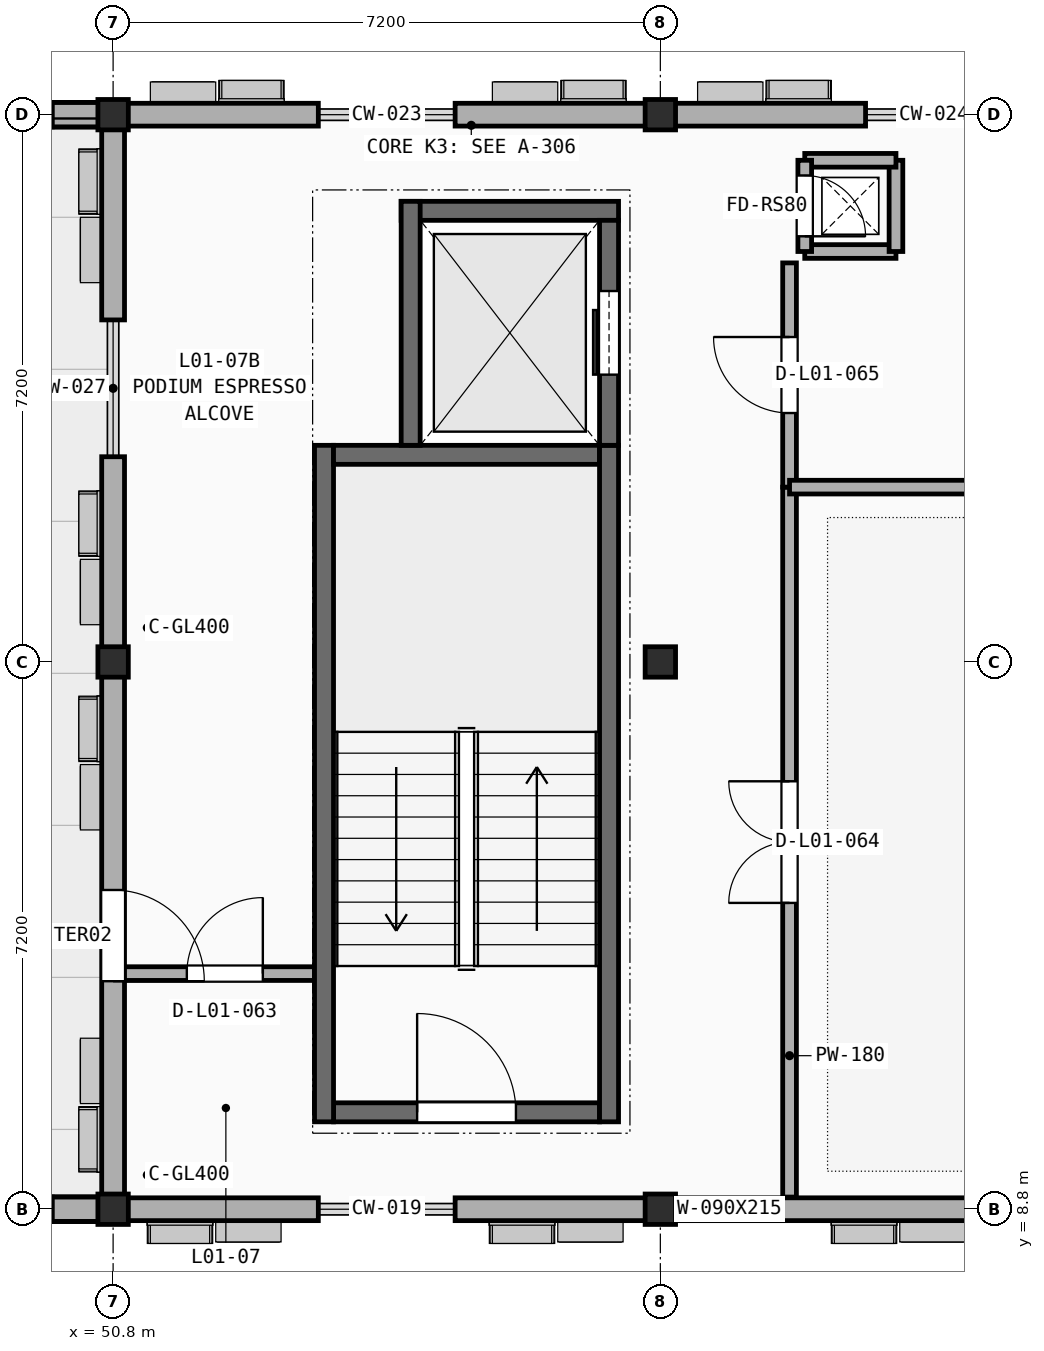
"""IFC4 building model, lengths in metres.
Left out: names, types, materials, properties, quantities, classifications, styles, units other than length and angle.
Written with IfcOpenShell. Run it as: python <this file> out.ifc"""

import sys

from ifc_helpers import new_model, si_unit, direction, frame, frame_2d, origin, origin_2d, place, context, subcontext, project, spatial, rectangle, extrude, element, fill, save


model = new_model("IFC4")
c1 = context("Model", 3, precision=1e-05, world=origin(), true_north=direction((0.0, 1.0)))
c2 = subcontext(c1, "Body", "Model", "MODEL_VIEW")
j1 = project(units=[si_unit("LENGTHUNIT", "METRE"), si_unit("PLANEANGLEUNIT", "RADIAN")], contexts=[c1])
p1 = place(None, origin())
s1 = spatial("IfcSite", under=j1, at=p1, CompositionType="ELEMENT")
p2 = place(p1, origin())
s2 = spatial("IfcBuilding", under=s1, at=p2, CompositionType="ELEMENT")
p3 = place(p2, frame((0.0, 0.0, 5.4)))
s3 = spatial("IfcBuildingStorey", under=s2, at=p3, CompositionType="ELEMENT", Elevation=5.4)
for number, where, z_axis, x_axis in (
    (1, (50.8, 8.8, 0.0), (0.0, 0.0, 1.0), (1.0, 0.0, 0.0)),
    (2, (50.8, 16.0, 0.0), (0.0, 0.0, 1.0), (1.0, 0.0, 0.0)),
    (3, (50.8, 23.2, 0.0), (0.0, 0.0, 1.0), (1.0, 0.0, 0.0)),
    (4, (58.0, 8.8, 0.0), (0.0, 0.0, 1.0), (1.0, 0.0, 0.0)),
    (5, (58.0, 16.0, 0.0), (0.0, 0.0, 1.0), (1.0, 0.0, 0.0)),
    (6, (58.0, 23.2, 0.0), (0.0, 0.0, 1.0), (1.0, 0.0, 0.0)),
):
    element("IfcColumn", number, at=place(p3, frame(where, z_axis=z_axis, x_axis=x_axis)), inside=s3, PredefinedType="COLUMN", context=c2, shape_type="SweptSolid", body=[
        extrude(rectangle(XDim=0.4, YDim=0.4, at=origin_2d()), origin(), (0.0, 0.0, 1.0), 4.2),
    ])
p4 = place(p3, frame((50.94, 11.9, 0.0), z_axis=(0.0, 0.0, 1.0), x_axis=(1.0, 0.0, 0.0)))
e7 = element("IfcWall", 7, at=p4, inside=s3, PredefinedType="PARTITIONING", context=c2, shape_type="SweptSolid", body=[
    extrude(rectangle(XDim=2.66, YDim=0.18, at=frame_2d((1.33, 0.0))), origin(), (0.0, 0.0, 1.0), 3.21),
])
p5 = place(p4, frame((0.83, 0.0, -0.01)))
e8 = element("IfcOpeningElement", 8, at=p5, cuts=e7, PredefinedType="OPENING", context=c2, shape_type="SweptSolid", body=[
    extrude(rectangle(XDim=1.0, YDim=2.16, at=frame_2d((0.5, 1.08))), frame((0.0, 0.1, 0.0), z_axis=(0.0, -1.0, 0.0), x_axis=(1.0, 0.0, 0.0)), (0.0, 0.0, 1.0), 0.2),
])
p6 = place(p3, frame((59.7, 8.96, 0.0), z_axis=(0.0, 0.0, 1.0), x_axis=(0.0, 1.0, 0.0)))
e9 = element("IfcWall", 9, at=p6, inside=s3, PredefinedType="PARTITIONING", context=c2, shape_type="SweptSolid", body=[
    extrude(rectangle(XDim=9.34, YDim=0.18, at=frame_2d((4.67, 0.0))), origin(), (0.0, 0.0, 1.0), 3.25),
])
p7 = place(p6, frame((3.87, 0.0, -0.01)))
e10 = element("IfcOpeningElement", 10, at=p7, cuts=e9, PredefinedType="OPENING", context=c2, shape_type="SweptSolid", body=[
    extrude(rectangle(XDim=1.6, YDim=2.21, at=frame_2d((0.8, 1.105))), frame((0.0, 0.1, 0.0), z_axis=(0.0, -1.0, 0.0), x_axis=(1.0, 0.0, 0.0)), (0.0, 0.0, 1.0), 0.2),
])
p8 = place(p3, frame((59.7, 18.3, 0.0), z_axis=(0.0, 0.0, 1.0), x_axis=(0.0, 1.0, 0.0)))
e11 = element("IfcWall", 11, at=p8, inside=s3, PredefinedType="PARTITIONING", context=c2, shape_type="SweptSolid", body=[
    extrude(rectangle(XDim=2.95, YDim=0.18, at=frame_2d((1.475, 0.0))), origin(), (0.0, 0.0, 1.0), 3.84),
])
p9 = place(p8, frame((0.975, 0.0, -0.01)))
e12 = element("IfcOpeningElement", 12, at=p9, cuts=e11, PredefinedType="OPENING", context=c2, shape_type="SweptSolid", body=[
    extrude(rectangle(XDim=1.0, YDim=2.16, at=frame_2d((0.5, 1.08))), frame((0.0, 0.1, 0.0), z_axis=(0.0, -1.0, 0.0), x_axis=(1.0, 0.0, 0.0)), (0.0, 0.0, 1.0), 0.2),
])
p10 = place(p3, frame((59.7, 18.3, 0.0), z_axis=(0.0, 0.0, 1.0), x_axis=(1.0, 0.0, 0.0)))
e13 = element("IfcWall", 13, at=p10, inside=s3, PredefinedType="PARTITIONING", context=c2, shape_type="SweptSolid", body=[
    extrude(rectangle(XDim=20.2, YDim=0.18, at=frame_2d((10.1, 0.0))), origin(), (0.0, 0.0, 1.0), 3.37),
])
p11 = place(p10, frame((7.68, 0.0, -0.01)))
e14 = element("IfcOpeningElement", 14, at=p11, cuts=e13, PredefinedType="OPENING", context=c2, shape_type="SweptSolid", body=[
    extrude(rectangle(XDim=1.0, YDim=2.16, at=frame_2d((0.5, 1.08))), frame((0.0, 0.1, 0.0), z_axis=(0.0, -1.0, 0.0), x_axis=(1.0, 0.0, 0.0)), (0.0, 0.0, 1.0), 0.2),
])
for number, where, z_axis, x_axis in (
    (15, (50.8, 8.8, 0.0), (0.0, 0.0, 1.0), (1.0, 0.0, 0.0)),
    (16, (55.3, 8.8, 0.0), (0.0, 0.0, 1.0), (1.0, 0.0, 0.0)),
):
    element("IfcWall", number, at=place(p3, frame(where, z_axis=z_axis, x_axis=x_axis)), inside=s3, PredefinedType="SOLIDWALL", context=c2, shape_type="SweptSolid", body=[
        extrude(rectangle(XDim=2.7, YDim=0.3, at=frame_2d((1.35, 0.0))), origin(), (0.0, 0.0, 1.0), 3.21),
    ])
p12 = place(p3, frame((58.0, 8.8, 0.0), z_axis=(0.0, 0.0, 1.0), x_axis=(1.0, 0.0, 0.0)))
e17 = element("IfcWall", 17, at=p12, inside=s3, PredefinedType="SOLIDWALL", context=c2, shape_type="SweptSolid", body=[
    extrude(rectangle(XDim=7.2, YDim=0.3, at=frame_2d((3.6, 0.0))), origin(), (0.0, 0.0, 1.0), 3.37),
])
p13 = place(p12, frame((0.46, 0.0, 0.85)))
e18 = element("IfcOpeningElement", 18, at=p13, cuts=e17, PredefinedType="OPENING", context=c2, shape_type="SweptSolid", body=[
    extrude(rectangle(XDim=0.9, YDim=2.15, at=frame_2d((0.45, 1.075))), frame((0.0, 0.16, 0.0), z_axis=(0.0, -1.0, 0.0), x_axis=(1.0, 0.0, 0.0)), (0.0, 0.0, 1.0), 0.32),
])
p14 = place(p12, frame((5.66, 0.0, 0.85)))
e19 = element("IfcOpeningElement", 19, at=p14, cuts=e17, PredefinedType="OPENING", context=c2, shape_type="SweptSolid", body=[
    extrude(rectangle(XDim=0.9, YDim=2.15, at=frame_2d((0.45, 1.075))), frame((0.0, 0.16, 0.0), z_axis=(0.0, -1.0, 0.0), x_axis=(1.0, 0.0, 0.0)), (0.0, 0.0, 1.0), 0.32),
])
for number, where, z_axis, x_axis in (
    (20, (58.0, 23.2, 0.0), (0.0, 0.0, 1.0), (-1.0, 0.0, 0.0)),
    (21, (53.5, 23.2, 0.0), (0.0, 0.0, 1.0), (-1.0, 0.0, 0.0)),
):
    element("IfcWall", number, at=place(p3, frame(where, z_axis=z_axis, x_axis=x_axis)), inside=s3, PredefinedType="SOLIDWALL", context=c2, shape_type="SweptSolid", body=[
        extrude(rectangle(XDim=2.7, YDim=0.3, at=frame_2d((1.35, 0.0))), origin(), (0.0, 0.0, 1.0), 3.21),
    ])
p15 = place(p3, frame((60.7, 23.2, 0.0), z_axis=(0.0, 0.0, 1.0), x_axis=(-1.0, 0.0, 0.0)))
e22 = element("IfcWall", 22, at=p15, inside=s3, PredefinedType="SOLIDWALL", context=c2, shape_type="SweptSolid", body=[
    extrude(rectangle(XDim=2.7, YDim=0.3, at=frame_2d((1.35, 0.0))), origin(), (0.0, 0.0, 1.0), 3.37),
])
p16 = place(p3, frame((50.8, 16.0, 0.0), z_axis=(0.0, 0.0, 1.0), x_axis=(0.0, -1.0, 0.0)))
e23 = element("IfcWall", 23, at=p16, inside=s3, PredefinedType="SOLIDWALL", context=c2, shape_type="SweptSolid", body=[
    extrude(rectangle(XDim=7.2, YDim=0.3, at=frame_2d((3.6, 0.0))), origin(), (0.0, 0.0, 1.0), 3.21),
])
p17 = place(p16, frame((3.0, 0.0, -0.01)))
e24 = element("IfcOpeningElement", 24, at=p17, cuts=e23, PredefinedType="OPENING", context=c2, shape_type="SweptSolid", body=[
    extrude(rectangle(XDim=1.2, YDim=2.21, at=frame_2d((0.6, 1.105))), frame((0.0, 0.16, 0.0), z_axis=(0.0, -1.0, 0.0), x_axis=(1.0, 0.0, 0.0)), (0.0, 0.0, 1.0), 0.32),
])
for number, where, z_axis, x_axis in (
    (25, (50.8, 23.2, 0.0), (0.0, 0.0, 1.0), (0.0, -1.0, 0.0)),
    (26, (50.8, 18.7, 0.0), (0.0, 0.0, 1.0), (0.0, -1.0, 0.0)),
):
    element("IfcWall", number, at=place(p3, frame(where, z_axis=z_axis, x_axis=x_axis)), inside=s3, PredefinedType="SOLIDWALL", context=c2, shape_type="SweptSolid", body=[
        extrude(rectangle(XDim=2.7, YDim=0.3, at=frame_2d((1.35, 0.0))), origin(), (0.0, 0.0, 1.0), 3.21),
    ])
p18 = place(p3, frame((49.65, 8.8, 0.0), z_axis=(0.0, 0.0, 1.0), x_axis=(1.0, 0.0, 0.0)))
e27 = element("IfcWall", 27, at=p18, inside=s3, PredefinedType="PARAPET", context=c2, shape_type="SweptSolid", body=[
    extrude(rectangle(XDim=1.15, YDim=0.32, at=frame_2d((0.575, 0.0))), origin(), (0.0, 0.0, 1.0), 3.21),
])
p19 = place(p3, frame((46.0, 8.8, 3.45), z_axis=(0.0, 0.0, 1.0), x_axis=(1.0, 0.0, 0.0)))
e28 = element("IfcWall", 28, at=p19, inside=s3, PredefinedType="PARAPET", context=c2, shape_type="SweptSolid", body=[
    extrude(rectangle(XDim=4.8, YDim=0.32, at=frame_2d((2.4, 0.0))), origin(), (0.0, 0.0, 1.0), 0.8),
])
p20 = place(p3, frame((46.0, 8.8, 4.25), z_axis=(0.0, 0.0, 1.0), x_axis=(1.0, 0.0, 0.0)))
e29 = element("IfcWall", 29, at=p20, inside=s3, PredefinedType="PARAPET", context=c2, shape_type="SweptSolid", body=[
    extrude(rectangle(XDim=4.8, YDim=0.32, at=frame_2d((2.4, 0.0))), origin(), (0.0, 0.0, 1.0), 0.6),
])
p21 = place(p3, frame((46.8, 8.8, 4.85), z_axis=(0.0, 0.0, 1.0), x_axis=(1.0, 0.0, 0.0)))
e30 = element("IfcWall", 30, at=p21, inside=s3, PredefinedType="PARAPET", context=c2, shape_type="SweptSolid", body=[
    extrude(rectangle(XDim=3.2, YDim=0.32, at=frame_2d((1.6, 0.0))), origin(), (0.0, 0.0, 1.0), 0.65),
])
p22 = place(p3, frame((49.65, 23.2, 0.0), z_axis=(0.0, 0.0, 1.0), x_axis=(1.0, 0.0, 0.0)))
e31 = element("IfcWall", 31, at=p22, inside=s3, PredefinedType="PARAPET", context=c2, shape_type="SweptSolid", body=[
    extrude(rectangle(XDim=1.15, YDim=0.32, at=frame_2d((0.575, 0.0))), origin(), (0.0, 0.0, 1.0), 3.21),
])
p23 = place(p3, frame((46.0, 23.2, 3.45), z_axis=(0.0, 0.0, 1.0), x_axis=(1.0, 0.0, 0.0)))
e32 = element("IfcWall", 32, at=p23, inside=s3, PredefinedType="PARAPET", context=c2, shape_type="SweptSolid", body=[
    extrude(rectangle(XDim=4.8, YDim=0.32, at=frame_2d((2.4, 0.0))), origin(), (0.0, 0.0, 1.0), 0.8),
])
p24 = place(p3, frame((46.0, 23.2, 4.25), z_axis=(0.0, 0.0, 1.0), x_axis=(1.0, 0.0, 0.0)))
e33 = element("IfcWall", 33, at=p24, inside=s3, PredefinedType="PARAPET", context=c2, shape_type="SweptSolid", body=[
    extrude(rectangle(XDim=4.8, YDim=0.32, at=frame_2d((2.4, 0.0))), origin(), (0.0, 0.0, 1.0), 0.6),
])
p25 = place(p3, frame((46.8, 23.2, 4.85), z_axis=(0.0, 0.0, 1.0), x_axis=(1.0, 0.0, 0.0)))
e34 = element("IfcWall", 34, at=p25, inside=s3, PredefinedType="PARAPET", context=c2, shape_type="SweptSolid", body=[
    extrude(rectangle(XDim=3.2, YDim=0.32, at=frame_2d((1.6, 0.0))), origin(), (0.0, 0.0, 1.0), 0.65),
])
p26 = place(p3, frame((53.7, 10.075, 0.0), z_axis=(0.0, 0.0, 1.0), x_axis=(1.0, 0.0, 0.0)))
e35 = element("IfcWall", 35, at=p26, inside=s3, PredefinedType="SHEAR", context=c2, shape_type="SweptSolid", body=[
    extrude(rectangle(XDim=3.5, YDim=0.25, at=frame_2d((1.75, 0.0))), origin(), (0.0, 0.0, 1.0), 4.2),
])
p27 = place(p26, frame((1.1, 0.0, -0.01)))
e36 = element("IfcOpeningElement", 36, at=p27, cuts=e35, PredefinedType="OPENING", context=c2, shape_type="SweptSolid", body=[
    extrude(rectangle(XDim=1.3, YDim=2.16, at=frame_2d((0.65, 1.08))), frame((0.0, 0.135, 0.0), z_axis=(0.0, -1.0, 0.0), x_axis=(1.0, 0.0, 0.0)), (0.0, 0.0, 1.0), 0.27),
])
p28 = place(p3, frame((53.575, 9.95, 0.0), z_axis=(0.0, 0.0, 1.0), x_axis=(0.0, 1.0, 0.0)))
e37 = element("IfcWall", 37, at=p28, inside=s3, PredefinedType="SHEAR", context=c2, shape_type="SweptSolid", body=[
    extrude(rectangle(XDim=8.9, YDim=0.25, at=frame_2d((4.45, 0.0))), origin(), (0.0, 0.0, 1.0), 4.2),
])
p29 = place(p3, frame((57.2, 18.725, 0.0), z_axis=(0.0, 0.0, 1.0), x_axis=(-1.0, 0.0, 0.0)))
e38 = element("IfcWall", 38, at=p29, inside=s3, PredefinedType="SHEAR", context=c2, shape_type="SweptSolid", body=[
    extrude(rectangle(XDim=3.5, YDim=0.25, at=frame_2d((1.75, 0.0))), origin(), (0.0, 0.0, 1.0), 4.2),
])
p30 = place(p3, frame((57.325, 9.95, 0.0), z_axis=(0.0, 0.0, 1.0), x_axis=(0.0, 1.0, 0.0)))
e39 = element("IfcWall", 39, at=p30, inside=s3, PredefinedType="SHEAR", context=c2, shape_type="SweptSolid", body=[
    extrude(rectangle(XDim=8.9, YDim=0.25, at=frame_2d((4.45, 0.0))), origin(), (0.0, 0.0, 1.0), 4.2),
])
p31 = place(p3, frame((54.59, 21.935, 0.0), z_axis=(0.0, 0.0, 1.0), x_axis=(1.0, 0.0, 0.0)))
e40 = element("IfcWall", 40, at=p31, inside=s3, PredefinedType="SHEAR", context=c2, shape_type="SweptSolid", body=[
    extrude(rectangle(XDim=2.86, YDim=0.25, at=frame_2d((1.43, 0.0))), origin(), (0.0, 0.0, 1.0), 4.2),
])
p32 = place(p3, frame((57.325, 18.85, 0.0), z_axis=(0.0, 0.0, 1.0), x_axis=(0.0, 1.0, 0.0)))
e41 = element("IfcWall", 41, at=p32, inside=s3, PredefinedType="SHEAR", context=c2, shape_type="SweptSolid", body=[
    extrude(rectangle(XDim=2.96, YDim=0.25, at=frame_2d((1.48, 0.0))), origin(), (0.0, 0.0, 1.0), 4.2),
])
p33 = place(p32, frame((0.93, 0.0, -0.01)))
e42 = element("IfcOpeningElement", 42, at=p33, cuts=e41, PredefinedType="OPENING", context=c2, shape_type="SweptSolid", body=[
    extrude(rectangle(XDim=1.1, YDim=2.16, at=frame_2d((0.55, 1.08))), frame((0.0, 0.135, 0.0), z_axis=(0.0, -1.0, 0.0), x_axis=(1.0, 0.0, 0.0)), (0.0, 0.0, 1.0), 0.27),
])
p34 = place(p3, frame((54.715, 18.85, 0.0), z_axis=(0.0, 0.0, 1.0), x_axis=(0.0, 1.0, 0.0)))
e43 = element("IfcWall", 43, at=p34, inside=s3, PredefinedType="SHEAR", context=c2, shape_type="SweptSolid", body=[
    extrude(rectangle(XDim=3.21, YDim=0.25, at=frame_2d((1.605, 0.0))), origin(), (0.0, 0.0, 1.0), 4.2),
])
for number, where, z_axis, x_axis in (
    (44, (59.9, 21.4, 0.0), (0.0, 0.0, 1.0), (1.0, 0.0, 0.0)),
    (45, (61.1, 21.4, 0.0), (0.0, 0.0, 1.0), (0.0, 1.0, 0.0)),
    (46, (61.1, 22.6, 0.0), (0.0, 0.0, 1.0), (-1.0, 0.0, 0.0)),
):
    element("IfcWall", number, at=place(p3, frame(where, z_axis=z_axis, x_axis=x_axis)), inside=s3, PredefinedType="SOLIDWALL", context=c2, shape_type="SweptSolid", body=[
        extrude(rectangle(XDim=1.2, YDim=0.18, at=frame_2d((0.6, 0.0))), origin(), (0.0, 0.0, 1.0), 3.97),
    ])
p35 = place(p3, frame((59.9, 22.6, 0.0), z_axis=(0.0, 0.0, 1.0), x_axis=(0.0, -1.0, 0.0)))
e47 = element("IfcWall", 47, at=p35, inside=s3, PredefinedType="SOLIDWALL", context=c2, shape_type="SweptSolid", body=[
    extrude(rectangle(XDim=1.2, YDim=0.18, at=frame_2d((0.6, 0.0))), origin(), (0.0, 0.0, 1.0), 3.97),
])
p36 = place(p35, frame((0.2, 0.0, -0.01)))
e48 = element("IfcOpeningElement", 48, at=p36, cuts=e47, PredefinedType="OPENING", context=c2, shape_type="SweptSolid", body=[
    extrude(rectangle(XDim=0.8, YDim=2.06, at=frame_2d((0.4, 1.03))), frame((0.0, 0.1, 0.0), z_axis=(0.0, -1.0, 0.0), x_axis=(1.0, 0.0, 0.0)), (0.0, 0.0, 1.0), 0.2),
])
p37 = place(p5, frame((1.0, 0.0, 0.01), z_axis=(0.0, 0.0, 1.0), x_axis=(-1.0, 0.0, 0.0)))
e49 = element("IfcDoor", 49, at=p37, inside=s3, OperationType="SINGLE_SWING_RIGHT", PredefinedType="DOOR", context=c2, shape_type="SweptSolid", body=[
    extrude(rectangle(XDim=1.0, YDim=2.15, at=frame_2d((0.5, 1.075))), frame((0.0, 0.025, 0.0), z_axis=(0.0, -1.0, 0.0), x_axis=(1.0, 0.0, 0.0)), (0.0, 0.0, 1.0), 0.05),
])
fill(e8, e49)
p38 = place(p7, frame((0.0, 0.0, 0.01)))
e50 = element("IfcDoor", 50, at=p38, inside=s3, OperationType="DOUBLE_SWING_LEFT", PredefinedType="DOOR", context=c2, shape_type="SweptSolid", body=[
    extrude(rectangle(XDim=1.6, YDim=2.2, at=frame_2d((0.8, 1.1))), frame((0.0, 0.025, 0.0), z_axis=(0.0, -1.0, 0.0), x_axis=(1.0, 0.0, 0.0)), (0.0, 0.0, 1.0), 0.05),
])
fill(e10, e50)
p39 = place(p9, frame((0.0, 0.0, 0.01)))
e51 = element("IfcDoor", 51, at=p39, inside=s3, OperationType="SINGLE_SWING_RIGHT", PredefinedType="DOOR", context=c2, shape_type="SweptSolid", body=[
    extrude(rectangle(XDim=1.0, YDim=2.15, at=frame_2d((0.5, 1.075))), frame((0.0, 0.025, 0.0), z_axis=(0.0, -1.0, 0.0), x_axis=(1.0, 0.0, 0.0)), (0.0, 0.0, 1.0), 0.05),
])
fill(e12, e51)
p40 = place(p13, origin())
e52 = element("IfcWindow", 52, at=p40, inside=s3, PartitioningType="SINGLE_PANEL", PredefinedType="WINDOW", context=c2, shape_type="SweptSolid", body=[
    extrude(rectangle(XDim=0.9, YDim=2.15, at=frame_2d((0.45, 1.075))), frame((0.0, 0.03, 0.0), z_axis=(0.0, -1.0, 0.0), x_axis=(1.0, 0.0, 0.0)), (0.0, 0.0, 1.0), 0.06),
])
fill(e18, e52)
p41 = place(p17, frame((0.0, 0.0, 0.01)))
e53 = element("IfcDoor", 53, at=p41, inside=s3, OperationType="SINGLE_SWING_RIGHT", PredefinedType="DOOR", context=c2, shape_type="SweptSolid", body=[
    extrude(rectangle(XDim=1.2, YDim=2.2, at=frame_2d((0.6, 1.1))), frame((0.0, 0.025, 0.0), z_axis=(0.0, -1.0, 0.0), x_axis=(1.0, 0.0, 0.0)), (0.0, 0.0, 1.0), 0.05),
])
fill(e24, e53)
p42 = place(p27, frame((1.3, 0.0, 0.01), z_axis=(0.0, 0.0, 1.0), x_axis=(-1.0, 0.0, 0.0)))
e54 = element("IfcDoor", 54, at=p42, inside=s3, OperationType="SINGLE_SWING_LEFT", PredefinedType="DOOR", context=c2, shape_type="SweptSolid", body=[
    extrude(rectangle(XDim=1.3, YDim=2.15, at=frame_2d((0.65, 1.075))), frame((0.0, 0.025, 0.0), z_axis=(0.0, -1.0, 0.0), x_axis=(1.0, 0.0, 0.0)), (0.0, 0.0, 1.0), 0.05),
])
fill(e36, e54)
p43 = place(p33, frame((0.0, 0.0, 0.01)))
e55 = element("IfcDoor", 55, at=p43, inside=s3, OperationType="SLIDING_TO_LEFT", PredefinedType="DOOR", context=c2, shape_type="SweptSolid", body=[
    extrude(rectangle(XDim=1.1, YDim=2.15, at=frame_2d((0.55, 1.075))), frame((0.0, 0.025, 0.0), z_axis=(0.0, -1.0, 0.0), x_axis=(1.0, 0.0, 0.0)), (0.0, 0.0, 1.0), 0.05),
])
fill(e42, e55)
p44 = place(p36, frame((0.0, 0.0, 0.01)))
e56 = element("IfcDoor", 56, at=p44, inside=s3, OperationType="SINGLE_SWING_RIGHT", PredefinedType="DOOR", context=c2, shape_type="SweptSolid", body=[
    extrude(rectangle(XDim=0.8, YDim=2.05, at=frame_2d((0.4, 1.025))), frame((0.0, 0.025, 0.0), z_axis=(0.0, -1.0, 0.0), x_axis=(1.0, 0.0, 0.0)), (0.0, 0.0, 1.0), 0.05),
])
fill(e48, e56)
save(model, sys.argv[1])
